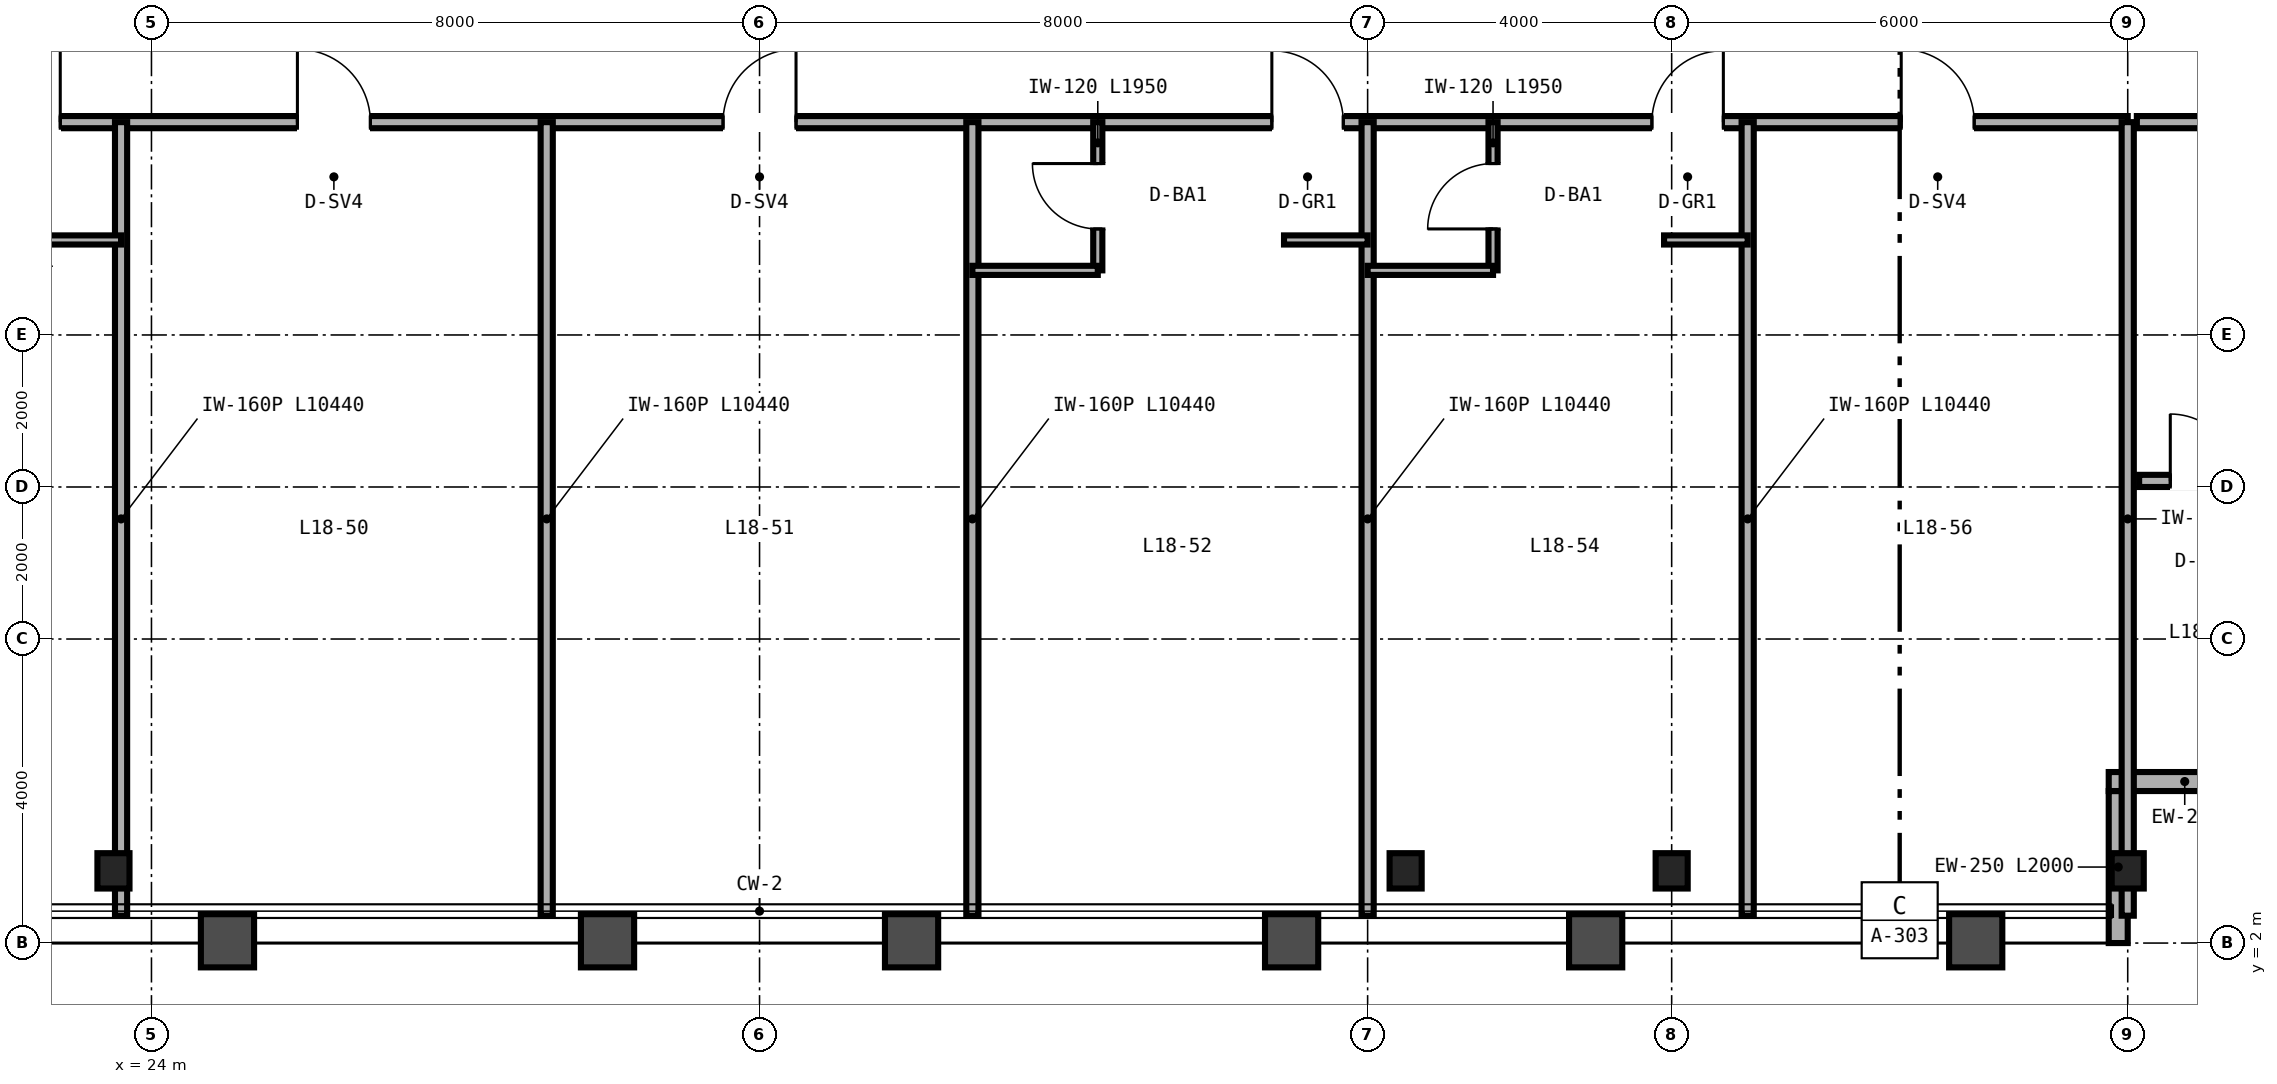
"""IFC4 building model, lengths in metres.
Left out: names, types, materials, properties, quantities, classifications, styles, units other than length and angle.
Written with IfcOpenShell. Run it as: python <this file> out.ifc"""

import sys

from ifc_helpers import new_model, si_unit, direction, frame, frame_2d, origin, origin_2d, place, context, subcontext, project, spatial, rectangle, i_section, extrude, source, transform, mapped, element, fill, save


model = new_model("IFC4")
c1 = context("Model", 3, precision=1e-05, world=origin(), true_north=direction((0.0, 1.0)))
c2 = subcontext(c1, "Body", "Model", "MODEL_VIEW")
j1 = project(units=[si_unit("LENGTHUNIT", "METRE"), si_unit("PLANEANGLEUNIT", "RADIAN")], contexts=[c1])
p1 = place(None, origin())
s1 = spatial("IfcSite", under=j1, at=p1, CompositionType="ELEMENT")
p2 = place(p1, origin())
s2 = spatial("IfcBuilding", under=s1, at=p2, CompositionType="ELEMENT")
p3 = place(p2, frame((0.0, 0.0, 74.4)))
s3 = spatial("IfcBuildingStorey", under=s2, at=p3, CompositionType="ELEMENT", Elevation=74.4)
m1 = source(origin(), c2, "Body", "SweptSolid", [
    extrude(i_section(OverallWidth=0.422, OverallDepth=0.465, WebThickness=0.045, FlangeThickness=0.073, FilletRadius=0.025, at=origin_2d()), origin(), (0.0, 0.0, 1.0), 3.35),
])
for number, where, z_axis, x_axis in (
    (1, (23.5, 2.95, 0.0), (0.0, 0.0, 1.0), (1.0, 0.0, 0.0)),
    (2, (40.5, 2.95, 0.0), (0.0, 0.0, 1.0), (1.0, 0.0, 0.0)),
    (3, (44.0, 2.95, 0.0), (0.0, 0.0, 1.0), (1.0, 0.0, 0.0)),
    (4, (50.0, 2.95, 0.0), (0.0, 0.0, 1.0), (1.0, 0.0, 0.0)),
):
    element("IfcColumn", number, at=place(p3, frame(where, z_axis=z_axis, x_axis=x_axis)), inside=s3, PredefinedType="COLUMN", context=c2, shape_type="MappedRepresentation", body=[
        mapped(m1, transform((0.0, 0.0, 0.0), scale=1.0)),
    ])
p4 = place(p3, frame((49.875, 2.0, 0.0), z_axis=(0.0, 0.0, 1.0), x_axis=(0.0, 1.0, 0.0)))
e5 = element("IfcWall", 5, at=p4, inside=s3, PredefinedType="SOLIDWALL", context=c2, shape_type="SweptSolid", body=[
    extrude(rectangle(XDim=2.0, YDim=0.25, at=frame_2d((1.0, 0.0))), origin(), (0.0, 0.0, 1.0), 2.657),
])
p5 = place(p3, frame((49.75, 4.125, 0.0), z_axis=(0.0, 0.0, 1.0), x_axis=(1.0, 0.0, 0.0)))
e6 = element("IfcWall", 6, at=p5, inside=s3, PredefinedType="SOLIDWALL", context=c2, shape_type="SweptSolid", body=[
    extrude(rectangle(XDim=2.0, YDim=0.25, at=frame_2d((1.0, 0.0))), origin(), (0.0, 0.0, 1.0), 3.35),
])
p6 = place(p3, frame((50.12, 12.8, 0.0), z_axis=(0.0, 0.0, 1.0), x_axis=(1.0, 0.0, 0.0)))
e7 = element("IfcWall", 7, at=p6, inside=s3, PredefinedType="PARTITIONING", context=c2, shape_type="SweptSolid", body=[
    extrude(rectangle(XDim=5.68, YDim=0.16, at=frame_2d((2.84, 0.0))), origin(), (0.0, 0.0, 1.0), 3.35),
])
p7 = place(p6, frame((2.36, 0.0, 0.0)))
e8 = element("IfcOpeningElement", 8, at=p7, cuts=e7, PredefinedType="OPENING", context=c2, shape_type="SweptSolid", body=[
    extrude(rectangle(XDim=0.96, YDim=2.15, at=frame_2d((0.48, 1.075))), frame((0.0, 0.09, 0.0), z_axis=(0.0, -1.0, 0.0), x_axis=(1.0, 0.0, 0.0)), (0.0, 0.0, 1.0), 0.18),
])
p8 = place(p3, frame((50.15, 8.08, 0.0), z_axis=(0.0, 0.0, 1.0), x_axis=(1.0, 0.0, 0.0)))
e9 = element("IfcWall", 9, at=p8, inside=s3, PredefinedType="PARTITIONING", context=c2, shape_type="SweptSolid", body=[
    extrude(rectangle(XDim=1.7, YDim=0.16, at=frame_2d((0.85, 0.0))), origin(), (0.0, 0.0, 1.0), 3.35),
])
p9 = place(p8, frame((0.41, 0.0, 0.0)))
e10 = element("IfcOpeningElement", 10, at=p9, cuts=e9, PredefinedType="OPENING", context=c2, shape_type="SweptSolid", body=[
    extrude(rectangle(XDim=0.88, YDim=2.15, at=frame_2d((0.44, 1.075))), frame((0.0, 0.09, 0.0), z_axis=(0.0, -1.0, 0.0), x_axis=(1.0, 0.0, 0.0)), (0.0, 0.0, 1.0), 0.18),
])
p10 = place(p3, frame((14.0, 12.8, 0.0), z_axis=(0.0, 0.0, 1.0), x_axis=(1.0, 0.0, 0.0)))
e11 = element("IfcWall", 11, at=p10, inside=s3, PredefinedType="PARTITIONING", context=c2, shape_type="SweptSolid", body=[
    extrude(rectangle(XDim=36.0, YDim=0.16, at=frame_2d((18.0, 0.0))), origin(), (0.0, 0.0, 1.0), 2.571),
])
p11 = place(p10, frame((3.54, 0.0, 0.0)))
e12 = element("IfcOpeningElement", 12, at=p11, cuts=e11, PredefinedType="OPENING", context=c2, shape_type="SweptSolid", body=[
    extrude(rectangle(XDim=0.94, YDim=2.15, at=frame_2d((0.47, 1.075))), frame((0.0, 0.09, 0.0), z_axis=(0.0, -1.0, 0.0), x_axis=(1.0, 0.0, 0.0)), (0.0, 0.0, 1.0), 0.18),
])
p12 = place(p10, frame((7.86, 0.0, 0.0)))
e13 = element("IfcOpeningElement", 13, at=p12, cuts=e11, PredefinedType="OPENING", context=c2, shape_type="SweptSolid", body=[
    extrude(rectangle(XDim=0.94, YDim=2.15, at=frame_2d((0.47, 1.075))), frame((0.0, 0.09, 0.0), z_axis=(0.0, -1.0, 0.0), x_axis=(1.0, 0.0, 0.0)), (0.0, 0.0, 1.0), 0.18),
])
p13 = place(p10, frame((11.92, 0.0, 0.0)))
e14 = element("IfcOpeningElement", 14, at=p13, cuts=e11, PredefinedType="OPENING", context=c2, shape_type="SweptSolid", body=[
    extrude(rectangle(XDim=0.96, YDim=2.15, at=frame_2d((0.48, 1.075))), frame((0.0, 0.09, 0.0), z_axis=(0.0, -1.0, 0.0), x_axis=(1.0, 0.0, 0.0)), (0.0, 0.0, 1.0), 0.18),
])
p14 = place(p10, frame((17.52, 0.0, 0.0)))
e15 = element("IfcOpeningElement", 15, at=p14, cuts=e11, PredefinedType="OPENING", context=c2, shape_type="SweptSolid", body=[
    extrude(rectangle(XDim=0.96, YDim=2.15, at=frame_2d((0.48, 1.075))), frame((0.0, 0.09, 0.0), z_axis=(0.0, -1.0, 0.0), x_axis=(1.0, 0.0, 0.0)), (0.0, 0.0, 1.0), 0.18),
])
p15 = place(p10, frame((24.74, 0.0, 0.0)))
e16 = element("IfcOpeningElement", 16, at=p15, cuts=e11, PredefinedType="OPENING", context=c2, shape_type="SweptSolid", body=[
    extrude(rectangle(XDim=0.94, YDim=2.15, at=frame_2d((0.47, 1.075))), frame((0.0, 0.09, 0.0), z_axis=(0.0, -1.0, 0.0), x_axis=(1.0, 0.0, 0.0)), (0.0, 0.0, 1.0), 0.18),
])
p16 = place(p10, frame((29.74, 0.0, 0.0)))
e17 = element("IfcOpeningElement", 17, at=p16, cuts=e11, PredefinedType="OPENING", context=c2, shape_type="SweptSolid", body=[
    extrude(rectangle(XDim=0.94, YDim=2.15, at=frame_2d((0.47, 1.075))), frame((0.0, 0.09, 0.0), z_axis=(0.0, -1.0, 0.0), x_axis=(1.0, 0.0, 0.0)), (0.0, 0.0, 1.0), 0.18),
])
p17 = place(p10, frame((33.02, 0.0, 0.0)))
e18 = element("IfcOpeningElement", 18, at=p17, cuts=e11, PredefinedType="OPENING", context=c2, shape_type="SweptSolid", body=[
    extrude(rectangle(XDim=0.96, YDim=2.15, at=frame_2d((0.48, 1.075))), frame((0.0, 0.09, 0.0), z_axis=(0.0, -1.0, 0.0), x_axis=(1.0, 0.0, 0.0)), (0.0, 0.0, 1.0), 0.18),
])
p18 = place(p3, frame((50.0, 2.36, 0.0), z_axis=(0.0, 0.0, 1.0), x_axis=(0.0, 1.0, 0.0)))
e19 = element("IfcWall", 19, at=p18, inside=s3, PredefinedType="PARTITIONING", context=c2, shape_type="SweptSolid", body=[
    extrude(rectangle(XDim=10.44, YDim=0.16, at=frame_2d((5.22, 0.0))), origin(), (0.0, 0.0, 1.0), 2.657),
])
p19 = place(p3, frame((23.6, 2.36, 0.0), z_axis=(0.0, 0.0, 1.0), x_axis=(0.0, 1.0, 0.0)))
e20 = element("IfcWall", 20, at=p19, inside=s3, PredefinedType="PARTITIONING", context=c2, shape_type="SweptSolid", body=[
    extrude(rectangle(XDim=10.44, YDim=0.16, at=frame_2d((5.22, 0.0))), origin(), (0.0, 0.0, 1.0), 2.423),
])
p20 = place(p3, frame((22.5, 11.25, 0.0), z_axis=(0.0, 0.0, 1.0), x_axis=(1.0, 0.0, 0.0)))
e21 = element("IfcWall", 21, at=p20, inside=s3, PredefinedType="PARTITIONING", context=c2, shape_type="SweptSolid", body=[
    extrude(rectangle(XDim=1.1, YDim=0.12, at=frame_2d((0.55, 0.0))), origin(), (0.0, 0.0, 1.0), 2.571),
])
for number, where, z_axis, x_axis in (
    (22, (29.2, 2.36, 0.0), (0.0, 0.0, 1.0), (0.0, 1.0, 0.0)),
    (23, (34.8, 2.36, 0.0), (0.0, 0.0, 1.0), (0.0, 1.0, 0.0)),
    (24, (40.0, 2.36, 0.0), (0.0, 0.0, 1.0), (0.0, 1.0, 0.0)),
):
    element("IfcWall", number, at=place(p3, frame(where, z_axis=z_axis, x_axis=x_axis)), inside=s3, PredefinedType="PARTITIONING", context=c2, shape_type="SweptSolid", body=[
        extrude(rectangle(XDim=10.44, YDim=0.16, at=frame_2d((5.22, 0.0))), origin(), (0.0, 0.0, 1.0), 2.423),
    ])
p21 = place(p3, frame((36.45, 10.85, 0.0), z_axis=(0.0, 0.0, 1.0), x_axis=(0.0, 1.0, 0.0)))
e25 = element("IfcWall", 25, at=p21, inside=s3, PredefinedType="PARTITIONING", context=c2, shape_type="SweptSolid", body=[
    extrude(rectangle(XDim=1.95, YDim=0.12, at=frame_2d((0.975, 0.0))), origin(), (0.0, 0.0, 1.0), 3.35),
])
p22 = place(p21, frame((0.545, 0.0, 0.0)))
e26 = element("IfcOpeningElement", 26, at=p22, cuts=e25, PredefinedType="OPENING", context=c2, shape_type="SweptSolid", body=[
    extrude(rectangle(XDim=0.86, YDim=2.1, at=frame_2d((0.43, 1.05))), frame((0.0, 0.07, 0.0), z_axis=(0.0, -1.0, 0.0), x_axis=(1.0, 0.0, 0.0)), (0.0, 0.0, 1.0), 0.14),
])
p23 = place(p3, frame((34.8, 10.85, 0.0), z_axis=(0.0, 0.0, 1.0), x_axis=(1.0, 0.0, 0.0)))
e27 = element("IfcWall", 27, at=p23, inside=s3, PredefinedType="PARTITIONING", context=c2, shape_type="SweptSolid", body=[
    extrude(rectangle(XDim=1.65, YDim=0.12, at=frame_2d((0.825, 0.0))), origin(), (0.0, 0.0, 1.0), 3.35),
])
p24 = place(p3, frame((38.9, 11.25, 0.0), z_axis=(0.0, 0.0, 1.0), x_axis=(1.0, 0.0, 0.0)))
e28 = element("IfcWall", 28, at=p24, inside=s3, PredefinedType="PARTITIONING", context=c2, shape_type="SweptSolid", body=[
    extrude(rectangle(XDim=1.1, YDim=0.12, at=frame_2d((0.55, 0.0))), origin(), (0.0, 0.0, 1.0), 3.35),
])
p25 = place(p3, frame((45.0, 2.36, 0.0), z_axis=(0.0, 0.0, 1.0), x_axis=(0.0, 1.0, 0.0)))
e29 = element("IfcWall", 29, at=p25, inside=s3, PredefinedType="PARTITIONING", context=c2, shape_type="SweptSolid", body=[
    extrude(rectangle(XDim=10.44, YDim=0.16, at=frame_2d((5.22, 0.0))), origin(), (0.0, 0.0, 1.0), 2.657),
])
p26 = place(p3, frame((41.65, 10.85, 0.0), z_axis=(0.0, 0.0, 1.0), x_axis=(0.0, 1.0, 0.0)))
e30 = element("IfcWall", 30, at=p26, inside=s3, PredefinedType="PARTITIONING", context=c2, shape_type="SweptSolid", body=[
    extrude(rectangle(XDim=1.95, YDim=0.12, at=frame_2d((0.975, 0.0))), origin(), (0.0, 0.0, 1.0), 3.35),
])
p27 = place(p26, frame((0.545, 0.0, 0.0)))
e31 = element("IfcOpeningElement", 31, at=p27, cuts=e30, PredefinedType="OPENING", context=c2, shape_type="SweptSolid", body=[
    extrude(rectangle(XDim=0.86, YDim=2.1, at=frame_2d((0.43, 1.05))), frame((0.0, 0.07, 0.0), z_axis=(0.0, -1.0, 0.0), x_axis=(1.0, 0.0, 0.0)), (0.0, 0.0, 1.0), 0.14),
])
p28 = place(p3, frame((40.0, 10.85, 0.0), z_axis=(0.0, 0.0, 1.0), x_axis=(1.0, 0.0, 0.0)))
e32 = element("IfcWall", 32, at=p28, inside=s3, PredefinedType="PARTITIONING", context=c2, shape_type="SweptSolid", body=[
    extrude(rectangle(XDim=1.65, YDim=0.12, at=frame_2d((0.825, 0.0))), origin(), (0.0, 0.0, 1.0), 2.571),
])
p29 = place(p3, frame((43.9, 11.25, 0.0), z_axis=(0.0, 0.0, 1.0), x_axis=(1.0, 0.0, 0.0)))
e33 = element("IfcWall", 33, at=p29, inside=s3, PredefinedType="PARTITIONING", context=c2, shape_type="SweptSolid", body=[
    extrude(rectangle(XDim=1.1, YDim=0.12, at=frame_2d((0.55, 0.0))), origin(), (0.0, 0.0, 1.0), 3.35),
])
m2 = source(origin(), c2, "Body", "SweptSolid", [
    extrude(rectangle(XDim=0.88, YDim=2.15, at=frame_2d((0.44, 1.075))), frame((0.0, 0.025, 0.0), z_axis=(0.0, -1.0, 0.0), x_axis=(1.0, 0.0, 0.0)), (0.0, 0.0, 1.0), 0.05),
])
p30 = place(p9, origin())
e34 = element("IfcDoor", 34, at=p30, inside=s3, OperationType="SINGLE_SWING_LEFT", PredefinedType="DOOR", context=c2, shape_type="MappedRepresentation", body=[
    mapped(m2, transform((0.0, 0.0, 0.0), scale=1.0)),
])
fill(e10, e34)
m3 = source(origin(), c2, "Body", "SweptSolid", [
    extrude(rectangle(XDim=0.86, YDim=2.1, at=frame_2d((0.43, 1.05))), frame((0.0, 0.025, 0.0), z_axis=(0.0, -1.0, 0.0), x_axis=(1.0, 0.0, 0.0)), (0.0, 0.0, 1.0), 0.05),
])
p31 = place(p22, origin())
e35 = element("IfcDoor", 35, at=p31, inside=s3, OperationType="SINGLE_SWING_RIGHT", PredefinedType="DOOR", context=c2, shape_type="MappedRepresentation", body=[
    mapped(m3, transform((0.0, 0.0, 0.0), scale=1.0)),
])
fill(e26, e35)
p32 = place(p27, origin())
e36 = element("IfcDoor", 36, at=p32, inside=s3, OperationType="SINGLE_SWING_LEFT", PredefinedType="DOOR", context=c2, shape_type="MappedRepresentation", body=[
    mapped(m3, transform((0.0, 0.0, 0.0), scale=1.0)),
])
fill(e31, e36)
m4 = source(origin(), c2, "Body", "SweptSolid", [
    extrude(rectangle(XDim=0.94, YDim=2.15, at=frame_2d((0.47, 1.075))), frame((0.0, 0.025, 0.0), z_axis=(0.0, -1.0, 0.0), x_axis=(1.0, 0.0, 0.0)), (0.0, 0.0, 1.0), 0.05),
])
p33 = place(p12, origin())
e37 = element("IfcDoor", 37, at=p33, inside=s3, OperationType="SINGLE_SWING_RIGHT", PredefinedType="DOOR", context=c2, shape_type="MappedRepresentation", body=[
    mapped(m4, transform((0.0, 0.0, 0.0), scale=1.0)),
])
fill(e13, e37)
m5 = source(origin(), c2, "Body", "SweptSolid", [
    extrude(rectangle(XDim=0.96, YDim=2.15, at=frame_2d((0.48, 1.075))), frame((0.0, 0.025, 0.0), z_axis=(0.0, -1.0, 0.0), x_axis=(1.0, 0.0, 0.0)), (0.0, 0.0, 1.0), 0.05),
])
p34 = place(p13, origin())
e38 = element("IfcDoor", 38, at=p34, inside=s3, OperationType="SINGLE_SWING_LEFT", PredefinedType="DOOR", context=c2, shape_type="MappedRepresentation", body=[
    mapped(m5, transform((0.0, 0.0, 0.0), scale=1.0)),
])
fill(e14, e38)
p35 = place(p14, origin())
e39 = element("IfcDoor", 39, at=p35, inside=s3, OperationType="SINGLE_SWING_RIGHT", PredefinedType="DOOR", context=c2, shape_type="MappedRepresentation", body=[
    mapped(m5, transform((0.0, 0.0, 0.0), scale=1.0)),
])
fill(e15, e39)
p36 = place(p15, origin())
e40 = element("IfcDoor", 40, at=p36, inside=s3, OperationType="SINGLE_SWING_LEFT", PredefinedType="DOOR", context=c2, shape_type="MappedRepresentation", body=[
    mapped(m4, transform((0.0, 0.0, 0.0), scale=1.0)),
])
fill(e16, e40)
p37 = place(p16, origin())
e41 = element("IfcDoor", 41, at=p37, inside=s3, OperationType="SINGLE_SWING_RIGHT", PredefinedType="DOOR", context=c2, shape_type="MappedRepresentation", body=[
    mapped(m4, transform((0.0, 0.0, 0.0), scale=1.0)),
])
fill(e17, e41)
p38 = place(p17, origin())
e42 = element("IfcDoor", 42, at=p38, inside=s3, OperationType="SINGLE_SWING_LEFT", PredefinedType="DOOR", context=c2, shape_type="MappedRepresentation", body=[
    mapped(m5, transform((0.0, 0.0, 0.0), scale=1.0)),
])
fill(e18, e42)
save(model, sys.argv[1])
